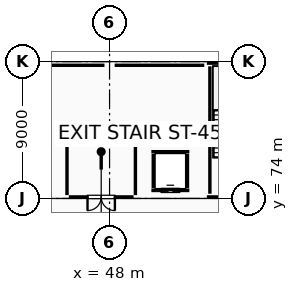
"""IFC4 building model, lengths in metres.
Left out: names, types, materials, properties, quantities, classifications, styles, units other than length and angle.
Written with IfcOpenShell. Run it as: python <this file> out.ifc"""

import sys

from ifc_helpers import new_model, si_unit, direction, frame, frame_2d, origin, origin_2d, place, context, subcontext, project, spatial, rectangle, extrude, element, fill, save


model = new_model("IFC4")
c1 = context("Model", 3, precision=1e-05, world=origin(), true_north=direction((0.0, 1.0)))
c2 = subcontext(c1, "Body", "Model", "MODEL_VIEW")
j1 = project(units=[si_unit("LENGTHUNIT", "METRE"), si_unit("PLANEANGLEUNIT", "RADIAN")], contexts=[c1])
p1 = place(None, origin())
s1 = spatial("IfcSite", under=j1, at=p1, CompositionType="ELEMENT")
p2 = place(p1, origin())
s2 = spatial("IfcBuilding", under=s1, at=p2, CompositionType="ELEMENT")
p3 = place(p2, frame((0.0, 0.0, 19.8)))
s3 = spatial("IfcBuildingStorey", under=s2, at=p3, CompositionType="ELEMENT", Elevation=19.8)
p4 = place(p3, frame((48.0, 83.0, 0.0), z_axis=(0.0, 0.0, 1.0), x_axis=(1.0, 0.0, 0.0)))
e1 = element("IfcColumn", 1, at=p4, inside=s3, PredefinedType="COLUMN", context=c2, shape_type="SweptSolid", body=[
    extrude(rectangle(XDim=0.65, YDim=0.65, at=origin_2d()), origin(), (0.0, 0.0, 1.0), 4.5),
])
p5 = place(p3, frame((40.335, 82.76, 0.0), z_axis=(0.0, 0.0, 1.0), x_axis=(1.0, 0.0, 0.0)))
e2 = element("IfcWall", 2, at=p5, inside=s3, PredefinedType="PARAPET", context=c2, shape_type="SweptSolid", body=[
    extrude(rectangle(XDim=7.33, YDim=0.18, at=frame_2d((3.665, 0.0))), origin(), (0.0, 0.0, 1.0), 0.88),
])
p6 = place(p3, frame((48.335, 82.76, 0.0), z_axis=(0.0, 0.0, 1.0), x_axis=(1.0, 0.0, 0.0)))
e3 = element("IfcWall", 3, at=p6, inside=s3, PredefinedType="PARAPET", context=c2, shape_type="SweptSolid", body=[
    extrude(rectangle(XDim=5.895, YDim=0.18, at=frame_2d((2.948, 0.0))), origin(), (0.0, 0.0, 1.0), 0.88),
])
p7 = place(p3, frame((54.4, 74.1, 0.0), z_axis=(0.0, 0.0, 1.0), x_axis=(1.0, 0.0, 0.0)))
e4 = element("IfcWall", 4, at=p7, inside=s3, PredefinedType="SHEAR", context=c2, shape_type="SweptSolid", body=[
    extrude(rectangle(XDim=8.4, YDim=0.4, at=frame_2d((4.2, 0.0))), origin(), (0.0, 0.0, 1.0), 4.25),
])
p8 = place(p7, frame((3.55, 0.0, 0.0)))
e5 = element("IfcOpeningElement", 5, at=p8, cuts=e4, PredefinedType="OPENING", context=c2, shape_type="SweptSolid", body=[
    extrude(rectangle(XDim=1.3, YDim=2.15, at=frame_2d((0.65, 1.075))), frame((0.0, 0.21, 0.0), z_axis=(0.0, -1.0, 0.0), x_axis=(1.0, 0.0, 0.0)), (0.0, 0.0, 1.0), 0.42),
])
p9 = place(p3, frame((62.8, 82.9, 0.0), z_axis=(0.0, 0.0, 1.0), x_axis=(-1.0, 0.0, 0.0)))
e6 = element("IfcWall", 6, at=p9, inside=s3, PredefinedType="SHEAR", context=c2, shape_type="SweptSolid", body=[
    extrude(rectangle(XDim=8.4, YDim=0.4, at=frame_2d((4.2, 0.0))), origin(), (0.0, 0.0, 1.0), 4.25),
])
p10 = place(p3, frame((54.6, 82.69, 0.0), z_axis=(0.0, 0.0, 1.0), x_axis=(0.0, -1.0, 0.0)))
e7 = element("IfcWall", 7, at=p10, inside=s3, PredefinedType="SHEAR", context=c2, shape_type="SweptSolid", body=[
    extrude(rectangle(XDim=8.38, YDim=0.4, at=frame_2d((4.19, 0.0))), origin(), (0.0, 0.0, 1.0), 4.25),
])
p11 = place(p3, frame((50.75, 74.525, 0.0), z_axis=(0.0, 0.0, 1.0), x_axis=(1.0, 0.0, 0.0)))
e8 = element("IfcWall", 8, at=p11, inside=s3, PredefinedType="STANDARD", context=c2, shape_type="SweptSolid", body=[
    extrude(rectangle(XDim=2.5, YDim=0.25, at=frame_2d((1.25, 0.0))), origin(), (0.0, 0.0, 1.0), 4.24),
])
p12 = place(p11, frame((0.65, 0.0, 0.0)))
e9 = element("IfcOpeningElement", 9, at=p12, cuts=e8, PredefinedType="OPENING", context=c2, shape_type="SweptSolid", body=[
    extrude(rectangle(XDim=1.2, YDim=2.05, at=frame_2d((0.6, 1.025))), frame((0.0, 0.135, 0.0), z_axis=(0.0, -1.0, 0.0), x_axis=(1.0, 0.0, 0.0)), (0.0, 0.0, 1.0), 0.27),
])
p13 = place(p3, frame((53.25, 77.075, 0.0), z_axis=(0.0, 0.0, 1.0), x_axis=(-1.0, 0.0, 0.0)))
e10 = element("IfcWall", 10, at=p13, inside=s3, PredefinedType="STANDARD", context=c2, shape_type="SweptSolid", body=[
    extrude(rectangle(XDim=2.5, YDim=0.25, at=frame_2d((1.25, 0.0))), origin(), (0.0, 0.0, 1.0), 4.24),
])
for number, where, z_axis, x_axis in (
    (11, (53.125, 74.66, 0.0), (0.0, 0.0, 1.0), (0.0, 1.0, 0.0)),
    (12, (50.875, 76.94, 0.0), (0.0, 0.0, 1.0), (0.0, -1.0, 0.0)),
):
    element("IfcWall", number, at=place(p3, frame(where, z_axis=z_axis, x_axis=x_axis)), inside=s3, PredefinedType="STANDARD", context=c2, shape_type="SweptSolid", body=[
        extrude(rectangle(XDim=2.28, YDim=0.25, at=frame_2d((1.14, 0.0))), origin(), (0.0, 0.0, 1.0), 4.24),
    ])
p14 = place(p3, frame((45.2, 74.22, 0.0), z_axis=(0.0, 0.0, 1.0), x_axis=(0.0, 1.0, 0.0)))
e13 = element("IfcWall", 13, at=p14, inside=s3, PredefinedType="PARTITIONING", context=c2, shape_type="SweptSolid", body=[
    extrude(rectangle(XDim=3.36, YDim=0.2, at=frame_2d((1.68, 0.0))), origin(), (0.0, 0.0, 1.0), 4.24),
])
p15 = place(p3, frame((45.32, 77.7, 0.0), z_axis=(0.0, 0.0, 1.0), x_axis=(1.0, 0.0, 0.0)))
e14 = element("IfcWall", 14, at=p15, inside=s3, PredefinedType="PARTITIONING", context=c2, shape_type="SweptSolid", body=[
    extrude(rectangle(XDim=4.26, YDim=0.2, at=frame_2d((2.13, 0.0))), origin(), (0.0, 0.0, 1.0), 4.24),
])
p16 = place(p3, frame((49.7, 77.58, 0.0), z_axis=(0.0, 0.0, 1.0), x_axis=(0.0, -1.0, 0.0)))
e15 = element("IfcWall", 15, at=p16, inside=s3, PredefinedType="PARTITIONING", context=c2, shape_type="SweptSolid", body=[
    extrude(rectangle(XDim=3.36, YDim=0.2, at=frame_2d((1.68, 0.0))), origin(), (0.0, 0.0, 1.0), 4.24),
])
p17 = place(p3, frame((49.58, 74.1, 0.0), z_axis=(0.0, 0.0, 1.0), x_axis=(-1.0, 0.0, 0.0)))
e16 = element("IfcWall", 16, at=p17, inside=s3, PredefinedType="PARTITIONING", context=c2, shape_type="SweptSolid", body=[
    extrude(rectangle(XDim=4.26, YDim=0.2, at=frame_2d((2.13, 0.0))), origin(), (0.0, 0.0, 1.0), 4.24),
])
p18 = place(p17, frame((1.23, 0.0, 0.0)))
e17 = element("IfcOpeningElement", 17, at=p18, cuts=e16, PredefinedType="OPENING", context=c2, shape_type="SweptSolid", body=[
    extrude(rectangle(XDim=1.8, YDim=2.15, at=frame_2d((0.9, 1.075))), frame((0.0, 0.11, 0.0), z_axis=(0.0, -1.0, 0.0), x_axis=(1.0, 0.0, 0.0)), (0.0, 0.0, 1.0), 0.22),
])
p19 = place(p12, origin())
e18 = element("IfcDoor", 18, at=p19, inside=s3, OperationType="DOUBLE_DOOR_SLIDING", PredefinedType="DOOR", context=c2, shape_type="SweptSolid", body=[
    extrude(rectangle(XDim=1.2, YDim=2.05, at=frame_2d((0.6, 1.025))), frame((0.0, 0.025, 0.0), z_axis=(0.0, -1.0, 0.0), x_axis=(1.0, 0.0, 0.0)), (0.0, 0.0, 1.0), 0.05),
])
fill(e9, e18)
p20 = place(p18, origin())
e19 = element("IfcDoor", 19, at=p20, inside=s3, OperationType="DOUBLE_DOOR_SINGLE_SWING", PredefinedType="DOOR", context=c2, shape_type="SweptSolid", body=[
    extrude(rectangle(XDim=1.8, YDim=2.15, at=frame_2d((0.9, 1.075))), frame((0.0, 0.025, 0.0), z_axis=(0.0, -1.0, 0.0), x_axis=(1.0, 0.0, 0.0)), (0.0, 0.0, 1.0), 0.05),
])
fill(e17, e19)
save(model, sys.argv[1])
